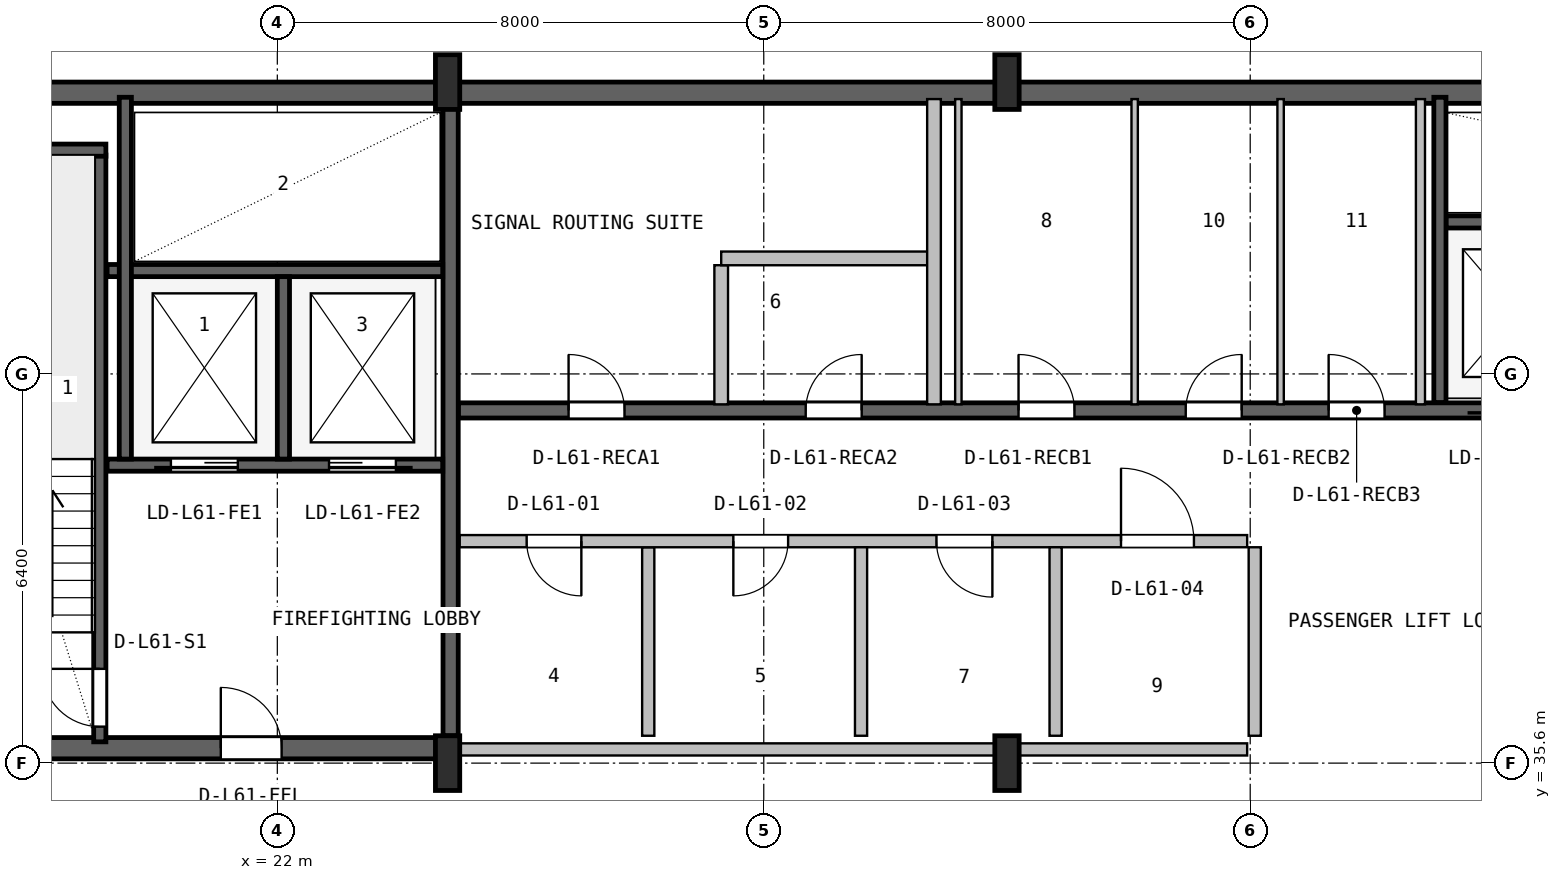
"""IFC4 building model, lengths in metres.
Left out: names, types, materials, properties, quantities, classifications, styles, units other than length and angle.
Written with IfcOpenShell. Run it as: python <this file> out.ifc"""

import sys

from ifc_helpers import new_model, si_unit, direction, frame, frame_2d, origin, origin_2d, place, context, subcontext, project, spatial, rectangle, i_section, extrude, source, transform, mapped, element, fill, save


model = new_model("IFC4")
c1 = context("Model", 3, precision=1e-05, world=origin(), true_north=direction((0.0, 1.0)))
c2 = subcontext(c1, "Body", "Model", "MODEL_VIEW")
j1 = project(units=[si_unit("LENGTHUNIT", "METRE"), si_unit("PLANEANGLEUNIT", "RADIAN")], contexts=[c1])
p1 = place(None, origin())
s1 = spatial("IfcSite", under=j1, at=p1, CompositionType="ELEMENT")
p2 = place(p1, origin())
s2 = spatial("IfcBuilding", under=s1, at=p2, CompositionType="ELEMENT")
p3 = place(p2, frame((0.0, 0.0, 247.0)))
s3 = spatial("IfcBuildingStorey", under=s2, at=p3, CompositionType="ELEMENT", Elevation=247.0)
p4 = place(p3, frame((15.6, 46.625, 0.0), z_axis=(0.0, 0.0, 1.0), x_axis=(1.0, 0.0, 0.0)))
e1 = element("IfcWall", 1, at=p4, inside=s3, PredefinedType="SHEAR", context=c2, shape_type="SweptSolid", body=[
    extrude(rectangle(XDim=36.8, YDim=0.35, at=frame_2d((18.4, 0.0))), origin(), (0.0, 0.0, 1.0), 3.55),
])
p5 = place(p3, frame((15.67, 35.845, 0.0), z_axis=(0.0, 0.0, 1.0), x_axis=(1.0, 0.0, 0.0)))
e2 = element("IfcWall", 2, at=p5, inside=s3, PredefinedType="SHEAR", context=c2, shape_type="SweptSolid", body=[
    extrude(rectangle(XDim=9.13, YDim=0.35, at=frame_2d((4.565, 0.0))), origin(), (0.0, 0.0, 1.0), 3.55),
])
p6 = place(p5, frame((5.4, 0.0, 0.0)))
e3 = element("IfcOpeningElement", 3, at=p6, cuts=e2, PredefinedType="OPENING", context=c2, shape_type="SweptSolid", body=[
    extrude(rectangle(XDim=1.0, YDim=2.1, at=frame_2d((0.5, 1.05))), frame((0.0, 0.185, 0.0), z_axis=(0.0, -1.0, 0.0), x_axis=(1.0, 0.0, 0.0)), (0.0, 0.0, 1.0), 0.37),
])
m1 = source(origin(), c2, "Body", "SweptSolid", [
    extrude(i_section(OverallWidth=0.4, OverallDepth=0.9, WebThickness=0.016, FlangeThickness=0.028, FilletRadius=0.016, at=origin_2d()), origin(), (0.0, 0.0, 1.0), 3.8),
])
for number, where, z_axis, x_axis in (
    (4, (24.8, 35.6, 0.0), (0.0, 0.0, 1.0), (1.0, 0.0, 0.0)),
    (5, (24.8, 46.8, 0.0), (0.0, 0.0, 1.0), (1.0, 0.0, 0.0)),
    (6, (34.0, 35.6, 0.0), (0.0, 0.0, 1.0), (1.0, 0.0, 0.0)),
    (7, (34.0, 46.8, 0.0), (0.0, 0.0, 1.0), (1.0, 0.0, 0.0)),
):
    element("IfcColumn", number, at=place(p3, frame(where, z_axis=z_axis, x_axis=x_axis)), inside=s3, PredefinedType="COLUMN", context=c2, shape_type="MappedRepresentation", body=[
        mapped(m1, transform((0.0, 0.0, 0.0), x_axis=(1.0, 0.0, 0.0), y_axis=(0.0, 1.0, 0.0), z_axis=(0.0, 0.0, 1.0), scale=1.0)),
    ])
p7 = place(p3, frame((19.08, 35.95, 0.0), z_axis=(0.0, 0.0, 1.0), x_axis=(0.0, 1.0, 0.0)))
e8 = element("IfcWall", 8, at=p7, inside=s3, PredefinedType="SHEAR", context=c2, shape_type="SweptSolid", body=[
    extrude(rectangle(XDim=9.65, YDim=0.2, at=frame_2d((4.825, 0.0))), origin(), (0.0, 0.0, 1.0), 3.55),
])
p8 = place(p7, frame((0.25, 0.0, 0.0)))
e9 = element("IfcOpeningElement", 9, at=p8, cuts=e8, PredefinedType="OPENING", context=c2, shape_type="SweptSolid", body=[
    extrude(rectangle(XDim=0.95, YDim=2.1, at=frame_2d((0.475, 1.05))), frame((0.0, 0.11, 0.0), z_axis=(0.0, -1.0, 0.0), x_axis=(1.0, 0.0, 0.0)), (0.0, 0.0, 1.0), 0.22),
])
p9 = place(p3, frame((15.95, 45.68, 0.0), z_axis=(0.0, 0.0, 1.0), x_axis=(1.0, 0.0, 0.0)))
e10 = element("IfcWall", 10, at=p9, inside=s3, PredefinedType="SHEAR", context=c2, shape_type="SweptSolid", body=[
    extrude(rectangle(XDim=3.23, YDim=0.2, at=frame_2d((1.615, 0.0))), origin(), (0.0, 0.0, 1.0), 3.55),
])
p10 = place(p3, frame((24.85, 36.05, 0.0), z_axis=(0.0, 0.0, 1.0), x_axis=(0.0, 1.0, 0.0)))
e11 = element("IfcWall", 11, at=p10, inside=s3, PredefinedType="SHEAR", context=c2, shape_type="SweptSolid", body=[
    extrude(rectangle(XDim=10.45, YDim=0.25, at=frame_2d((5.225, 0.0))), origin(), (0.0, 0.0, 1.0), 3.55),
])
p11 = place(p3, frame((19.2, 40.5, 0.0), z_axis=(0.0, 0.0, 1.0), x_axis=(1.0, 0.0, 0.0)))
e12 = element("IfcWall", 12, at=p11, inside=s3, PredefinedType="SHEAR", context=c2, shape_type="SweptSolid", body=[
    extrude(rectangle(XDim=5.52, YDim=0.2, at=frame_2d((2.76, 0.0))), origin(), (0.0, 0.0, 1.0), 3.55),
])
p12 = place(p11, frame((1.05, 0.0, 0.0)))
e13 = element("IfcOpeningElement", 13, at=p12, cuts=e12, PredefinedType="OPENING", context=c2, shape_type="SweptSolid", body=[
    extrude(rectangle(XDim=1.1, YDim=2.18, at=frame_2d((0.55, 1.09))), frame((0.0, 0.11, 0.0), z_axis=(0.0, -1.0, 0.0), x_axis=(1.0, 0.0, 0.0)), (0.0, 0.0, 1.0), 0.22),
])
p13 = place(p11, frame((3.65, 0.0, 0.0)))
e14 = element("IfcOpeningElement", 14, at=p13, cuts=e12, PredefinedType="OPENING", context=c2, shape_type="SweptSolid", body=[
    extrude(rectangle(XDim=1.1, YDim=2.18, at=frame_2d((0.55, 1.09))), frame((0.0, 0.11, 0.0), z_axis=(0.0, -1.0, 0.0), x_axis=(1.0, 0.0, 0.0)), (0.0, 0.0, 1.0), 0.22),
])
p14 = place(p3, frame((19.2, 43.7, 0.0), z_axis=(0.0, 0.0, 1.0), x_axis=(1.0, 0.0, 0.0)))
e15 = element("IfcWall", 15, at=p14, inside=s3, PredefinedType="SHEAR", context=c2, shape_type="SweptSolid", body=[
    extrude(rectangle(XDim=5.52, YDim=0.2, at=frame_2d((2.76, 0.0))), origin(), (0.0, 0.0, 1.0), 3.55),
])
p15 = place(p3, frame((22.1, 40.6, 0.0), z_axis=(0.0, 0.0, 1.0), x_axis=(0.0, 1.0, 0.0)))
e16 = element("IfcWall", 16, at=p15, inside=s3, PredefinedType="SHEAR", context=c2, shape_type="SweptSolid", body=[
    extrude(rectangle(XDim=3.0, YDim=0.2, at=frame_2d((1.5, 0.0))), origin(), (0.0, 0.0, 1.0), 3.55),
])
p16 = place(p3, frame((19.5, 40.6, 0.0), z_axis=(0.0, 0.0, 1.0), x_axis=(0.0, 1.0, 0.0)))
e17 = element("IfcWall", 17, at=p16, inside=s3, PredefinedType="SHEAR", context=c2, shape_type="SweptSolid", body=[
    extrude(rectangle(XDim=5.95, YDim=0.2, at=frame_2d((2.975, 0.0))), origin(), (0.0, 0.0, 1.0), 3.55),
])
p17 = place(p3, frame((24.98, 41.4, 0.0), z_axis=(0.0, 0.0, 1.0), x_axis=(1.0, 0.0, 0.0)))
e18 = element("IfcWall", 18, at=p17, inside=s3, PredefinedType="SHEAR", context=c2, shape_type="SweptSolid", body=[
    extrude(rectangle(XDim=23.82, YDim=0.25, at=frame_2d((11.91, 0.0))), origin(), (0.0, 0.0, 1.0), 3.55),
])
p18 = place(p17, frame((16.87, 0.0, 0.0)))
e19 = element("IfcOpeningElement", 19, at=p18, cuts=e18, PredefinedType="OPENING", context=c2, shape_type="SweptSolid", body=[
    extrude(rectangle(XDim=1.1, YDim=2.18, at=frame_2d((0.55, 1.09))), frame((0.0, 0.135, 0.0), z_axis=(0.0, -1.0, 0.0), x_axis=(1.0, 0.0, 0.0)), (0.0, 0.0, 1.0), 0.27),
])
p19 = place(p17, frame((19.47, 0.0, 0.0)))
e20 = element("IfcOpeningElement", 20, at=p19, cuts=e18, PredefinedType="OPENING", context=c2, shape_type="SweptSolid", body=[
    extrude(rectangle(XDim=1.1, YDim=2.18, at=frame_2d((0.55, 1.09))), frame((0.0, 0.135, 0.0), z_axis=(0.0, -1.0, 0.0), x_axis=(1.0, 0.0, 0.0)), (0.0, 0.0, 1.0), 0.27),
])
p20 = place(p17, frame((22.07, 0.0, 0.0)))
e21 = element("IfcOpeningElement", 21, at=p20, cuts=e18, PredefinedType="OPENING", context=c2, shape_type="SweptSolid", body=[
    extrude(rectangle(XDim=1.1, YDim=2.18, at=frame_2d((0.55, 1.09))), frame((0.0, 0.135, 0.0), z_axis=(0.0, -1.0, 0.0), x_axis=(1.0, 0.0, 0.0)), (0.0, 0.0, 1.0), 0.27),
])
p21 = place(p17, frame((1.81, 0.0, 0.0)))
e22 = element("IfcOpeningElement", 22, at=p21, cuts=e18, PredefinedType="OPENING", context=c2, shape_type="SweptSolid", body=[
    extrude(rectangle(XDim=0.92, YDim=2.08, at=frame_2d((0.46, 1.04))), frame((0.0, 0.135, 0.0), z_axis=(0.0, -1.0, 0.0), x_axis=(1.0, 0.0, 0.0)), (0.0, 0.0, 1.0), 0.27),
])
p22 = place(p17, frame((5.71, 0.0, 0.0)))
e23 = element("IfcOpeningElement", 23, at=p22, cuts=e18, PredefinedType="OPENING", context=c2, shape_type="SweptSolid", body=[
    extrude(rectangle(XDim=0.92, YDim=2.08, at=frame_2d((0.46, 1.04))), frame((0.0, 0.135, 0.0), z_axis=(0.0, -1.0, 0.0), x_axis=(1.0, 0.0, 0.0)), (0.0, 0.0, 1.0), 0.27),
])
p23 = place(p17, frame((9.21, 0.0, 0.0)))
e24 = element("IfcOpeningElement", 24, at=p23, cuts=e18, PredefinedType="OPENING", context=c2, shape_type="SweptSolid", body=[
    extrude(rectangle(XDim=0.92, YDim=2.08, at=frame_2d((0.46, 1.04))), frame((0.0, 0.135, 0.0), z_axis=(0.0, -1.0, 0.0), x_axis=(1.0, 0.0, 0.0)), (0.0, 0.0, 1.0), 0.27),
])
p24 = place(p17, frame((11.96, 0.0, 0.0)))
e25 = element("IfcOpeningElement", 25, at=p24, cuts=e18, PredefinedType="OPENING", context=c2, shape_type="SweptSolid", body=[
    extrude(rectangle(XDim=0.92, YDim=2.08, at=frame_2d((0.46, 1.04))), frame((0.0, 0.135, 0.0), z_axis=(0.0, -1.0, 0.0), x_axis=(1.0, 0.0, 0.0)), (0.0, 0.0, 1.0), 0.27),
])
p25 = place(p17, frame((14.31, 0.0, 0.0)))
e26 = element("IfcOpeningElement", 26, at=p25, cuts=e18, PredefinedType="OPENING", context=c2, shape_type="SweptSolid", body=[
    extrude(rectangle(XDim=0.92, YDim=2.08, at=frame_2d((0.46, 1.04))), frame((0.0, 0.135, 0.0), z_axis=(0.0, -1.0, 0.0), x_axis=(1.0, 0.0, 0.0)), (0.0, 0.0, 1.0), 0.27),
])
p26 = place(p3, frame((41.22, 44.5, 0.0), z_axis=(0.0, 0.0, 1.0), x_axis=(1.0, 0.0, 0.0)))
e27 = element("IfcWall", 27, at=p26, inside=s3, PredefinedType="SHEAR", context=c2, shape_type="SweptSolid", body=[
    extrude(rectangle(XDim=7.58, YDim=0.2, at=frame_2d((3.79, 0.0))), origin(), (0.0, 0.0, 1.0), 3.55),
])
p27 = place(p3, frame((41.12, 41.53, 0.0), z_axis=(0.0, 0.0, 1.0), x_axis=(0.0, 1.0, 0.0)))
e28 = element("IfcWall", 28, at=p27, inside=s3, PredefinedType="SHEAR", context=c2, shape_type="SweptSolid", body=[
    extrude(rectangle(XDim=5.02, YDim=0.2, at=frame_2d((2.51, 0.0))), origin(), (0.0, 0.0, 1.0), 3.55),
])
p28 = place(p3, frame((25.0, 35.825, 0.0), z_axis=(0.0, 0.0, 1.0), x_axis=(1.0, 0.0, 0.0)))
e29 = element("IfcWall", 29, at=p28, inside=s3, PredefinedType="SOLIDWALL", context=c2, shape_type="SweptSolid", body=[
    extrude(rectangle(XDim=12.95, YDim=0.2, at=frame_2d((6.475, 0.0))), origin(), (0.0, 0.0, 1.0), 2.575),
])
p29 = place(p3, frame((28.1, 36.05, 0.0), z_axis=(0.0, 0.0, 1.0), x_axis=(0.0, 1.0, 0.0)))
e30 = element("IfcWall", 30, at=p29, inside=s3, PredefinedType="PLUMBINGWALL", context=c2, shape_type="SweptSolid", body=[
    extrude(rectangle(XDim=3.1, YDim=0.2, at=frame_2d((1.55, 0.0))), origin(), (0.0, 0.0, 1.0), 3.53),
])
p30 = place(p3, frame((25.0, 39.25, 0.0), z_axis=(0.0, 0.0, 1.0), x_axis=(1.0, 0.0, 0.0)))
e31 = element("IfcWall", 31, at=p30, inside=s3, PredefinedType="SOLIDWALL", context=c2, shape_type="SweptSolid", body=[
    extrude(rectangle(XDim=12.95, YDim=0.2, at=frame_2d((6.475, 0.0))), origin(), (0.0, 0.0, 1.0), 3.53),
])
p31 = place(p30, frame((1.1, 0.0, 0.0)))
e32 = element("IfcOpeningElement", 32, at=p31, cuts=e31, PredefinedType="OPENING", context=c2, shape_type="SweptSolid", body=[
    extrude(rectangle(XDim=0.9, YDim=2.06, at=frame_2d((0.45, 1.03))), frame((0.0, 0.11, 0.0), z_axis=(0.0, -1.0, 0.0), x_axis=(1.0, 0.0, 0.0)), (0.0, 0.0, 1.0), 0.22),
])
p32 = place(p30, frame((4.5, 0.0, 0.0)))
e33 = element("IfcOpeningElement", 33, at=p32, cuts=e31, PredefinedType="OPENING", context=c2, shape_type="SweptSolid", body=[
    extrude(rectangle(XDim=0.9, YDim=2.06, at=frame_2d((0.45, 1.03))), frame((0.0, 0.11, 0.0), z_axis=(0.0, -1.0, 0.0), x_axis=(1.0, 0.0, 0.0)), (0.0, 0.0, 1.0), 0.22),
])
p33 = place(p30, frame((7.84, 0.0, 0.0)))
e34 = element("IfcOpeningElement", 34, at=p33, cuts=e31, PredefinedType="OPENING", context=c2, shape_type="SweptSolid", body=[
    extrude(rectangle(XDim=0.92, YDim=2.08, at=frame_2d((0.46, 1.04))), frame((0.0, 0.11, 0.0), z_axis=(0.0, -1.0, 0.0), x_axis=(1.0, 0.0, 0.0)), (0.0, 0.0, 1.0), 0.22),
])
p34 = place(p30, frame((10.875, 0.0, 0.0)))
e35 = element("IfcOpeningElement", 35, at=p34, cuts=e31, PredefinedType="OPENING", context=c2, shape_type="SweptSolid", body=[
    extrude(rectangle(XDim=1.2, YDim=2.1, at=frame_2d((0.6, 1.05))), frame((0.0, 0.11, 0.0), z_axis=(0.0, -1.0, 0.0), x_axis=(1.0, 0.0, 0.0)), (0.0, 0.0, 1.0), 0.22),
])
p35 = place(p3, frame((31.6, 36.05, 0.0), z_axis=(0.0, 0.0, 1.0), x_axis=(0.0, 1.0, 0.0)))
e36 = element("IfcWall", 36, at=p35, inside=s3, PredefinedType="PLUMBINGWALL", context=c2, shape_type="SweptSolid", body=[
    extrude(rectangle(XDim=3.1, YDim=0.2, at=frame_2d((1.55, 0.0))), origin(), (0.0, 0.0, 1.0), 3.53),
])
for number, where, z_axis, x_axis in (
    (37, (34.8, 36.05, 0.0), (0.0, 0.0, 1.0), (0.0, 1.0, 0.0)),
    (38, (38.075, 36.05, 0.0), (0.0, 0.0, 1.0), (0.0, 1.0, 0.0)),
):
    element("IfcWall", number, at=place(p3, frame(where, z_axis=z_axis, x_axis=x_axis)), inside=s3, PredefinedType="SOLIDWALL", context=c2, shape_type="SweptSolid", body=[
        extrude(rectangle(XDim=3.1, YDim=0.2, at=frame_2d((1.55, 0.0))), origin(), (0.0, 0.0, 1.0), 3.53),
    ])
p36 = place(p3, frame((29.3, 41.5, 0.0), z_axis=(0.0, 0.0, 1.0), x_axis=(0.0, 1.0, 0.0)))
e39 = element("IfcWall", 39, at=p36, inside=s3, PredefinedType="PARTITIONING", context=c2, shape_type="SweptSolid", body=[
    extrude(rectangle(XDim=2.288, YDim=0.225, at=frame_2d((1.144, 0.0))), origin(), (0.0, 0.0, 1.0), 3.53),
])
p37 = place(p3, frame((29.3, 43.9, 0.0), z_axis=(0.0, 0.0, 1.0), x_axis=(1.0, 0.0, 0.0)))
e40 = element("IfcWall", 40, at=p37, inside=s3, PredefinedType="PARTITIONING", context=c2, shape_type="SweptSolid", body=[
    extrude(rectangle(XDim=3.5, YDim=0.225, at=frame_2d((1.75, 0.0))), origin(), (0.0, 0.0, 1.0), 3.53),
])
p38 = place(p3, frame((32.8, 41.5, 0.0), z_axis=(0.0, 0.0, 1.0), x_axis=(0.0, 1.0, 0.0)))
e41 = element("IfcWall", 41, at=p38, inside=s3, PredefinedType="PARTITIONING", context=c2, shape_type="SweptSolid", body=[
    extrude(rectangle(XDim=5.02, YDim=0.225, at=frame_2d((2.51, 0.0))), origin(), (0.0, 0.0, 1.0), 3.53),
])
for number, where, z_axis, x_axis in (
    (42, (36.1, 41.5, 0.0), (0.0, 0.0, 1.0), (0.0, 1.0, 0.0)),
    (43, (33.2, 41.5, 0.0), (0.0, 0.0, 1.0), (0.0, 1.0, 0.0)),
    (44, (38.5, 41.5, 0.0), (0.0, 0.0, 1.0), (0.0, 1.0, 0.0)),
):
    element("IfcWall", number, at=place(p3, frame(where, z_axis=z_axis, x_axis=x_axis)), inside=s3, PredefinedType="PARTITIONING", context=c2, shape_type="SweptSolid", body=[
        extrude(rectangle(XDim=5.02, YDim=0.105, at=frame_2d((2.51, 0.0))), origin(), (0.0, 0.0, 1.0), 3.53),
    ])
p39 = place(p3, frame((40.8, 41.5, 0.0), z_axis=(0.0, 0.0, 1.0), x_axis=(0.0, 1.0, 0.0)))
e45 = element("IfcWall", 45, at=p39, inside=s3, PredefinedType="PARTITIONING", context=c2, shape_type="SweptSolid", body=[
    extrude(rectangle(XDim=5.02, YDim=0.15, at=frame_2d((2.51, 0.0))), origin(), (0.0, 0.0, 1.0), 3.53),
])
m2 = source(origin(), c2, "Body", "SweptSolid", [
    extrude(rectangle(XDim=0.95, YDim=2.1, at=frame_2d((0.475, 1.05))), frame((0.0, 0.025, 0.0), z_axis=(0.0, -1.0, 0.0), x_axis=(1.0, 0.0, 0.0)), (0.0, 0.0, 1.0), 0.05),
])
p40 = place(p8, origin())
e46 = element("IfcDoor", 46, at=p40, inside=s3, OperationType="SINGLE_SWING_RIGHT", PredefinedType="DOOR", context=c2, shape_type="MappedRepresentation", body=[
    mapped(m2, transform((0.0, 0.0, 0.0), x_axis=(1.0, 0.0, 0.0), y_axis=(0.0, 1.0, 0.0), z_axis=(0.0, 0.0, 1.0), scale=1.0)),
])
fill(e9, e46)
m3 = source(origin(), c2, "Body", "SweptSolid", [
    extrude(rectangle(XDim=1.0, YDim=2.1, at=frame_2d((0.5, 1.05))), frame((0.0, 0.025, 0.0), z_axis=(0.0, -1.0, 0.0), x_axis=(1.0, 0.0, 0.0)), (0.0, 0.0, 1.0), 0.05),
])
p41 = place(p6, origin())
e47 = element("IfcDoor", 47, at=p41, inside=s3, OperationType="SINGLE_SWING_LEFT", PredefinedType="DOOR", context=c2, shape_type="MappedRepresentation", body=[
    mapped(m3, transform((0.0, 0.0, 0.0), x_axis=(1.0, 0.0, 0.0), y_axis=(0.0, 1.0, 0.0), z_axis=(0.0, 0.0, 1.0), scale=1.0)),
])
fill(e3, e47)
m4 = source(origin(), c2, "Body", "SweptSolid", [
    extrude(rectangle(XDim=1.1, YDim=2.18, at=frame_2d((0.55, 1.09))), frame((0.0, 0.025, 0.0), z_axis=(0.0, -1.0, 0.0), x_axis=(1.0, 0.0, 0.0)), (0.0, 0.0, 1.0), 0.05),
])
p42 = place(p12, frame((1.1, 0.0, 0.0), z_axis=(0.0, 0.0, 1.0), x_axis=(-1.0, 0.0, 0.0)))
e48 = element("IfcDoor", 48, at=p42, inside=s3, OperationType="SLIDING_TO_LEFT", PredefinedType="DOOR", context=c2, shape_type="MappedRepresentation", body=[
    mapped(m4, transform((0.0, 0.0, 0.0), x_axis=(1.0, 0.0, 0.0), y_axis=(0.0, 1.0, 0.0), z_axis=(0.0, 0.0, 1.0), scale=1.0)),
])
fill(e13, e48)
p43 = place(p13, frame((1.1, 0.0, 0.0), z_axis=(0.0, 0.0, 1.0), x_axis=(-1.0, 0.0, 0.0)))
e49 = element("IfcDoor", 49, at=p43, inside=s3, OperationType="SLIDING_TO_RIGHT", PredefinedType="DOOR", context=c2, shape_type="MappedRepresentation", body=[
    mapped(m4, transform((0.0, 0.0, 0.0), x_axis=(1.0, 0.0, 0.0), y_axis=(0.0, 1.0, 0.0), z_axis=(0.0, 0.0, 1.0), scale=1.0)),
])
fill(e14, e49)
m5 = source(origin(), c2, "Body", "SweptSolid", [
    extrude(rectangle(XDim=0.92, YDim=2.08, at=frame_2d((0.46, 1.04))), frame((0.0, 0.025, 0.0), z_axis=(0.0, -1.0, 0.0), x_axis=(1.0, 0.0, 0.0)), (0.0, 0.0, 1.0), 0.05),
])
p44 = place(p21, origin())
e50 = element("IfcDoor", 50, at=p44, inside=s3, OperationType="SINGLE_SWING_LEFT", PredefinedType="DOOR", context=c2, shape_type="MappedRepresentation", body=[
    mapped(m5, transform((0.0, 0.0, 0.0), x_axis=(1.0, 0.0, 0.0), y_axis=(0.0, 1.0, 0.0), z_axis=(0.0, 0.0, 1.0), scale=1.0)),
])
fill(e22, e50)
p45 = place(p22, origin())
e51 = element("IfcDoor", 51, at=p45, inside=s3, OperationType="SINGLE_SWING_RIGHT", PredefinedType="DOOR", context=c2, shape_type="MappedRepresentation", body=[
    mapped(m5, transform((0.0, 0.0, 0.0), x_axis=(1.0, 0.0, 0.0), y_axis=(0.0, 1.0, 0.0), z_axis=(0.0, 0.0, 1.0), scale=1.0)),
])
fill(e23, e51)
p46 = place(p23, origin())
e52 = element("IfcDoor", 52, at=p46, inside=s3, OperationType="SINGLE_SWING_LEFT", PredefinedType="DOOR", context=c2, shape_type="MappedRepresentation", body=[
    mapped(m5, transform((0.0, 0.0, 0.0), x_axis=(1.0, 0.0, 0.0), y_axis=(0.0, 1.0, 0.0), z_axis=(0.0, 0.0, 1.0), scale=1.0)),
])
fill(e24, e52)
p47 = place(p24, origin())
e53 = element("IfcDoor", 53, at=p47, inside=s3, OperationType="SINGLE_SWING_RIGHT", PredefinedType="DOOR", context=c2, shape_type="MappedRepresentation", body=[
    mapped(m5, transform((0.0, 0.0, 0.0), x_axis=(1.0, 0.0, 0.0), y_axis=(0.0, 1.0, 0.0), z_axis=(0.0, 0.0, 1.0), scale=1.0)),
])
fill(e25, e53)
p48 = place(p25, origin())
e54 = element("IfcDoor", 54, at=p48, inside=s3, OperationType="SINGLE_SWING_LEFT", PredefinedType="DOOR", context=c2, shape_type="MappedRepresentation", body=[
    mapped(m5, transform((0.0, 0.0, 0.0), x_axis=(1.0, 0.0, 0.0), y_axis=(0.0, 1.0, 0.0), z_axis=(0.0, 0.0, 1.0), scale=1.0)),
])
fill(e26, e54)
m6 = source(origin(), c2, "Body", "SweptSolid", [
    extrude(rectangle(XDim=0.9, YDim=2.06, at=frame_2d((0.45, 1.03))), frame((0.0, 0.025, 0.0), z_axis=(0.0, -1.0, 0.0), x_axis=(1.0, 0.0, 0.0)), (0.0, 0.0, 1.0), 0.05),
])
p49 = place(p31, frame((0.9, 0.0, 0.0), z_axis=(0.0, 0.0, 1.0), x_axis=(-1.0, 0.0, 0.0)))
e55 = element("IfcDoor", 55, at=p49, inside=s3, OperationType="SINGLE_SWING_RIGHT", PredefinedType="DOOR", context=c2, shape_type="MappedRepresentation", body=[
    mapped(m6, transform((0.0, 0.0, 0.0), x_axis=(1.0, 0.0, 0.0), y_axis=(0.0, 1.0, 0.0), z_axis=(0.0, 0.0, 1.0), scale=1.0)),
])
fill(e32, e55)
p50 = place(p32, frame((0.9, 0.0, 0.0), z_axis=(0.0, 0.0, 1.0), x_axis=(-1.0, 0.0, 0.0)))
e56 = element("IfcDoor", 56, at=p50, inside=s3, OperationType="SINGLE_SWING_LEFT", PredefinedType="DOOR", context=c2, shape_type="MappedRepresentation", body=[
    mapped(m6, transform((0.0, 0.0, 0.0), x_axis=(1.0, 0.0, 0.0), y_axis=(0.0, 1.0, 0.0), z_axis=(0.0, 0.0, 1.0), scale=1.0)),
])
fill(e33, e56)
p51 = place(p33, frame((0.92, 0.0, 0.0), z_axis=(0.0, 0.0, 1.0), x_axis=(-1.0, 0.0, 0.0)))
e57 = element("IfcDoor", 57, at=p51, inside=s3, OperationType="SINGLE_SWING_RIGHT", PredefinedType="DOOR", context=c2, shape_type="MappedRepresentation", body=[
    mapped(m5, transform((0.0, 0.0, 0.0), x_axis=(1.0, 0.0, 0.0), y_axis=(0.0, 1.0, 0.0), z_axis=(0.0, 0.0, 1.0), scale=1.0)),
])
fill(e34, e57)
m7 = source(origin(), c2, "Body", "SweptSolid", [
    extrude(rectangle(XDim=1.2, YDim=2.1, at=frame_2d((0.6, 1.05))), frame((0.0, 0.025, 0.0), z_axis=(0.0, -1.0, 0.0), x_axis=(1.0, 0.0, 0.0)), (0.0, 0.0, 1.0), 0.05),
])
p52 = place(p34, origin())
e58 = element("IfcDoor", 58, at=p52, inside=s3, OperationType="SINGLE_SWING_LEFT", PredefinedType="DOOR", context=c2, shape_type="MappedRepresentation", body=[
    mapped(m7, transform((0.0, 0.0, 0.0), x_axis=(1.0, 0.0, 0.0), y_axis=(0.0, 1.0, 0.0), z_axis=(0.0, 0.0, 1.0), scale=1.0)),
])
fill(e35, e58)
save(model, sys.argv[1])
